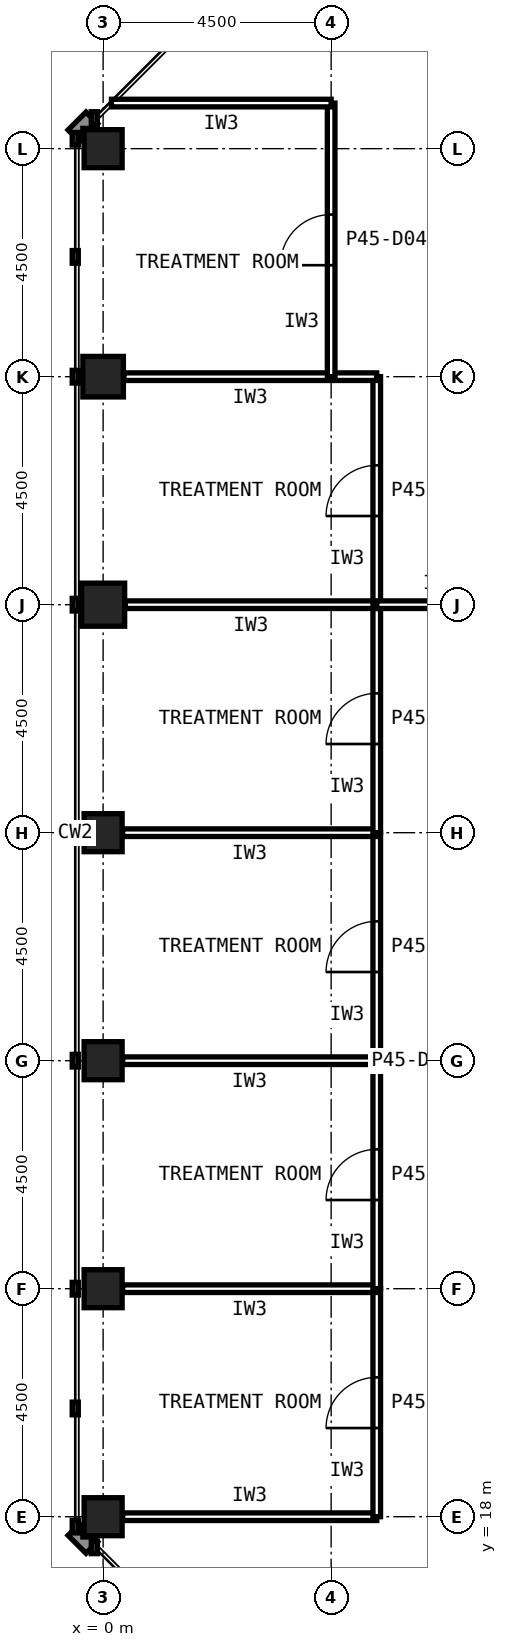
"""IFC4 building model, lengths in metres.
Left out: names, types, materials, properties, quantities, classifications, styles, units other than length and angle.
Written with IfcOpenShell. Run it as: python <this file> out.ifc"""

import sys

from ifc_helpers import new_model, si_unit, direction, frame, frame_2d, origin, origin_2d, place, context, subcontext, project, spatial, rectangle, hollow_rectangle, extrude, element, fill, save


model = new_model("IFC4")
c1 = context("Model", 3, precision=1e-05, world=origin(), true_north=direction((0.0, 1.0)))
c2 = subcontext(c1, "Body", "Model", "MODEL_VIEW")
j1 = project(units=[si_unit("LENGTHUNIT", "METRE"), si_unit("PLANEANGLEUNIT", "RADIAN")], contexts=[c1])
p1 = place(None, origin())
s1 = spatial("IfcSite", under=j1, at=p1, CompositionType="ELEMENT")
p2 = place(p1, origin())
s2 = spatial("IfcBuilding", under=s1, at=p2, CompositionType="ELEMENT")
p3 = place(p2, frame((0.0, 0.0, 191.6)))
s3 = spatial("IfcBuildingStorey", under=s2, at=p3, CompositionType="ELEMENT", Elevation=191.6)
p4 = place(p3, frame((0.0, 45.0, 0.0), z_axis=(0.0, 0.0, 1.0), x_axis=(1.0, 0.0, 0.0)))
e1 = element("IfcColumn", 1, at=p4, inside=s3, PredefinedType="COLUMN", context=c2, shape_type="SweptSolid", body=[
    extrude(hollow_rectangle(XDim=0.75, YDim=0.75, WallThickness=0.04, at=origin_2d()), origin(), (0.0, 0.0, 1.0), 4.0),
])
p5 = place(p3, frame((0.0, 40.5, 0.0), z_axis=(0.0, 0.0, 1.0), x_axis=(1.0, 0.0, 0.0)))
e2 = element("IfcColumn", 2, at=p5, inside=s3, PredefinedType="COLUMN", context=c2, shape_type="SweptSolid", body=[
    extrude(hollow_rectangle(XDim=0.8, YDim=0.8, WallThickness=0.045, at=origin_2d()), origin(), (0.0, 0.0, 1.0), 4.0),
])
p6 = place(p3, frame((0.0, 36.0, 0.0), z_axis=(0.0, 0.0, 1.0), x_axis=(1.0, 0.0, 0.0)))
e3 = element("IfcColumn", 3, at=p6, inside=s3, PredefinedType="COLUMN", context=c2, shape_type="SweptSolid", body=[
    extrude(hollow_rectangle(XDim=0.85, YDim=0.85, WallThickness=0.05, at=origin_2d()), origin(), (0.0, 0.0, 1.0), 4.0),
])
for number, where, z_axis, x_axis in (
    (4, (0.0, 31.5, 0.0), (0.0, 0.0, 1.0), (1.0, 0.0, 0.0)),
    (5, (0.0, 27.0, 0.0), (0.0, 0.0, 1.0), (1.0, 0.0, 0.0)),
    (6, (0.0, 22.5, 0.0), (0.0, 0.0, 1.0), (1.0, 0.0, 0.0)),
    (7, (0.0, 18.0, 0.0), (0.0, 0.0, 1.0), (1.0, 0.0, 0.0)),
):
    element("IfcColumn", number, at=place(p3, frame(where, z_axis=z_axis, x_axis=x_axis)), inside=s3, PredefinedType="COLUMN", context=c2, shape_type="SweptSolid", body=[
        extrude(hollow_rectangle(XDim=0.75, YDim=0.75, WallThickness=0.04, at=origin_2d()), origin(), (0.0, 0.0, 1.0), 4.0),
    ])
p7 = place(p3, frame((0.385, 18.0, 0.0), z_axis=(0.0, 0.0, 1.0), x_axis=(1.0, 0.0, 0.0)))
e8 = element("IfcWall", 8, at=p7, inside=s3, PredefinedType="PARTITIONING", context=c2, shape_type="SweptSolid", body=[
    extrude(rectangle(XDim=5.015, YDim=0.15, at=frame_2d((2.507, 0.0))), origin(), (0.0, 0.0, 1.0), 2.989),
])
p8 = place(p3, frame((5.4, 18.0, 0.0), z_axis=(0.0, 0.0, 1.0), x_axis=(0.0, 1.0, 0.0)))
e9 = element("IfcWall", 9, at=p8, inside=s3, PredefinedType="PARTITIONING", context=c2, shape_type="SweptSolid", body=[
    extrude(rectangle(XDim=4.5, YDim=0.15, at=frame_2d((2.25, 0.0))), origin(), (0.0, 0.0, 1.0), 3.84),
])
p9 = place(p8, frame((1.75, 0.0, 0.0)))
e10 = element("IfcOpeningElement", 10, at=p9, cuts=e9, PredefinedType="OPENING", context=c2, shape_type="SweptSolid", body=[
    extrude(rectangle(XDim=1.0, YDim=2.1, at=frame_2d((0.5, 1.05))), frame((0.0, 0.085, 0.0), z_axis=(0.0, -1.0, 0.0), x_axis=(1.0, 0.0, 0.0)), (0.0, 0.0, 1.0), 0.17),
])
p10 = place(p3, frame((5.4, 22.5, 0.0), z_axis=(0.0, 0.0, 1.0), x_axis=(-1.0, 0.0, 0.0)))
e11 = element("IfcWall", 11, at=p10, inside=s3, PredefinedType="PARTITIONING", context=c2, shape_type="SweptSolid", body=[
    extrude(rectangle(XDim=5.015, YDim=0.15, at=frame_2d((2.507, 0.0))), origin(), (0.0, 0.0, 1.0), 2.989),
])
p11 = place(p3, frame((5.4, 22.5, 0.0), z_axis=(0.0, 0.0, 1.0), x_axis=(0.0, 1.0, 0.0)))
e12 = element("IfcWall", 12, at=p11, inside=s3, PredefinedType="PARTITIONING", context=c2, shape_type="SweptSolid", body=[
    extrude(rectangle(XDim=4.5, YDim=0.15, at=frame_2d((2.25, 0.0))), origin(), (0.0, 0.0, 1.0), 3.84),
])
p12 = place(p11, frame((1.75, 0.0, 0.0)))
e13 = element("IfcOpeningElement", 13, at=p12, cuts=e12, PredefinedType="OPENING", context=c2, shape_type="SweptSolid", body=[
    extrude(rectangle(XDim=1.0, YDim=2.1, at=frame_2d((0.5, 1.05))), frame((0.0, 0.085, 0.0), z_axis=(0.0, -1.0, 0.0), x_axis=(1.0, 0.0, 0.0)), (0.0, 0.0, 1.0), 0.17),
])
p13 = place(p3, frame((5.4, 27.0, 0.0), z_axis=(0.0, 0.0, 1.0), x_axis=(-1.0, 0.0, 0.0)))
e14 = element("IfcWall", 14, at=p13, inside=s3, PredefinedType="PARTITIONING", context=c2, shape_type="SweptSolid", body=[
    extrude(rectangle(XDim=5.015, YDim=0.15, at=frame_2d((2.507, 0.0))), origin(), (0.0, 0.0, 1.0), 2.989),
])
p14 = place(p3, frame((5.4, 27.0, 0.0), z_axis=(0.0, 0.0, 1.0), x_axis=(0.0, 1.0, 0.0)))
e15 = element("IfcWall", 15, at=p14, inside=s3, PredefinedType="PARTITIONING", context=c2, shape_type="SweptSolid", body=[
    extrude(rectangle(XDim=4.5, YDim=0.15, at=frame_2d((2.25, 0.0))), origin(), (0.0, 0.0, 1.0), 3.84),
])
p15 = place(p14, frame((1.75, 0.0, 0.0)))
e16 = element("IfcOpeningElement", 16, at=p15, cuts=e15, PredefinedType="OPENING", context=c2, shape_type="SweptSolid", body=[
    extrude(rectangle(XDim=1.0, YDim=2.1, at=frame_2d((0.5, 1.05))), frame((0.0, 0.085, 0.0), z_axis=(0.0, -1.0, 0.0), x_axis=(1.0, 0.0, 0.0)), (0.0, 0.0, 1.0), 0.17),
])
p16 = place(p3, frame((5.4, 31.5, 0.0), z_axis=(0.0, 0.0, 1.0), x_axis=(-1.0, 0.0, 0.0)))
e17 = element("IfcWall", 17, at=p16, inside=s3, PredefinedType="PARTITIONING", context=c2, shape_type="SweptSolid", body=[
    extrude(rectangle(XDim=5.015, YDim=0.15, at=frame_2d((2.507, 0.0))), origin(), (0.0, 0.0, 1.0), 2.989),
])
p17 = place(p3, frame((5.4, 31.5, 0.0), z_axis=(0.0, 0.0, 1.0), x_axis=(0.0, 1.0, 0.0)))
e18 = element("IfcWall", 18, at=p17, inside=s3, PredefinedType="PARTITIONING", context=c2, shape_type="SweptSolid", body=[
    extrude(rectangle(XDim=4.5, YDim=0.15, at=frame_2d((2.25, 0.0))), origin(), (0.0, 0.0, 1.0), 3.84),
])
p18 = place(p17, frame((1.75, 0.0, 0.0)))
e19 = element("IfcOpeningElement", 19, at=p18, cuts=e18, PredefinedType="OPENING", context=c2, shape_type="SweptSolid", body=[
    extrude(rectangle(XDim=1.0, YDim=2.1, at=frame_2d((0.5, 1.05))), frame((0.0, 0.085, 0.0), z_axis=(0.0, -1.0, 0.0), x_axis=(1.0, 0.0, 0.0)), (0.0, 0.0, 1.0), 0.17),
])
p19 = place(p3, frame((5.4, 36.0, 0.0), z_axis=(0.0, 0.0, 1.0), x_axis=(-1.0, 0.0, 0.0)))
e20 = element("IfcWall", 20, at=p19, inside=s3, PredefinedType="PARTITIONING", context=c2, shape_type="SweptSolid", body=[
    extrude(rectangle(XDim=4.965, YDim=0.15, at=frame_2d((2.482, 0.0))), origin(), (0.0, 0.0, 1.0), 2.989),
])
p20 = place(p3, frame((5.4, 36.0, 0.0), z_axis=(0.0, 0.0, 1.0), x_axis=(0.0, 1.0, 0.0)))
e21 = element("IfcWall", 21, at=p20, inside=s3, PredefinedType="PARTITIONING", context=c2, shape_type="SweptSolid", body=[
    extrude(rectangle(XDim=4.5, YDim=0.15, at=frame_2d((2.25, 0.0))), origin(), (0.0, 0.0, 1.0), 3.84),
])
p21 = place(p20, frame((1.75, 0.0, 0.0)))
e22 = element("IfcOpeningElement", 22, at=p21, cuts=e21, PredefinedType="OPENING", context=c2, shape_type="SweptSolid", body=[
    extrude(rectangle(XDim=1.0, YDim=2.1, at=frame_2d((0.5, 1.05))), frame((0.0, 0.085, 0.0), z_axis=(0.0, -1.0, 0.0), x_axis=(1.0, 0.0, 0.0)), (0.0, 0.0, 1.0), 0.17),
])
p22 = place(p3, frame((5.4, 40.5, 0.0), z_axis=(0.0, 0.0, 1.0), x_axis=(-1.0, 0.0, 0.0)))
e23 = element("IfcWall", 23, at=p22, inside=s3, PredefinedType="PARTITIONING", context=c2, shape_type="SweptSolid", body=[
    extrude(rectangle(XDim=4.99, YDim=0.15, at=frame_2d((2.495, 0.0))), origin(), (0.0, 0.0, 1.0), 2.989),
])
p23 = place(p3, frame((4.5, 40.5, 0.0), z_axis=(0.0, 0.0, 1.0), x_axis=(0.0, 1.0, 0.0)))
e24 = element("IfcWall", 24, at=p23, inside=s3, PredefinedType="PARTITIONING", context=c2, shape_type="SweptSolid", body=[
    extrude(rectangle(XDim=5.4, YDim=0.15, at=frame_2d((2.7, 0.0))), origin(), (0.0, 0.0, 1.0), 3.84),
])
p24 = place(p23, frame((2.2, 0.0, 0.0)))
e25 = element("IfcOpeningElement", 25, at=p24, cuts=e24, PredefinedType="OPENING", context=c2, shape_type="SweptSolid", body=[
    extrude(rectangle(XDim=1.0, YDim=2.1, at=frame_2d((0.5, 1.05))), frame((0.0, 0.085, 0.0), z_axis=(0.0, -1.0, 0.0), x_axis=(1.0, 0.0, 0.0)), (0.0, 0.0, 1.0), 0.17),
])
p25 = place(p3, frame((4.5, 45.9, 0.0), z_axis=(0.0, 0.0, 1.0), x_axis=(-1.0, 0.0, 0.0)))
e26 = element("IfcWall", 26, at=p25, inside=s3, PredefinedType="PARTITIONING", context=c2, shape_type="SweptSolid", body=[
    extrude(rectangle(XDim=4.335, YDim=0.15, at=frame_2d((2.168, 0.0))), origin(), (0.0, 0.0, 1.0), 3.84),
])
p26 = place(p3, frame((5.4, 36.0, 0.0), z_axis=(0.0, 0.0, 1.0), x_axis=(1.0, 0.0, 0.0)))
e27 = element("IfcWall", 27, at=p26, inside=s3, PredefinedType="PARTITIONING", context=c2, shape_type="SweptSolid", body=[
    extrude(rectangle(XDim=6.3, YDim=0.15, at=frame_2d((3.15, 0.0))), origin(), (0.0, 0.0, 1.0), 2.989),
])
p27 = place(p26, frame((2.65, 0.0, 0.0)))
e28 = element("IfcOpeningElement", 28, at=p27, cuts=e27, PredefinedType="OPENING", context=c2, shape_type="SweptSolid", body=[
    extrude(rectangle(XDim=1.0, YDim=2.1, at=frame_2d((0.5, 1.05))), frame((0.0, 0.085, 0.0), z_axis=(0.0, -1.0, 0.0), x_axis=(1.0, 0.0, 0.0)), (0.0, 0.0, 1.0), 0.17),
])
p28 = place(p9, origin())
e29 = element("IfcDoor", 29, at=p28, inside=s3, OperationType="SINGLE_SWING_LEFT", PredefinedType="DOOR", context=c2, shape_type="SweptSolid", body=[
    extrude(rectangle(XDim=1.0, YDim=2.1, at=frame_2d((0.5, 1.05))), frame((0.0, 0.025, 0.0), z_axis=(0.0, -1.0, 0.0), x_axis=(1.0, 0.0, 0.0)), (0.0, 0.0, 1.0), 0.05),
])
fill(e10, e29)
p29 = place(p12, origin())
e30 = element("IfcDoor", 30, at=p29, inside=s3, OperationType="SINGLE_SWING_LEFT", PredefinedType="DOOR", context=c2, shape_type="SweptSolid", body=[
    extrude(rectangle(XDim=1.0, YDim=2.1, at=frame_2d((0.5, 1.05))), frame((0.0, 0.025, 0.0), z_axis=(0.0, -1.0, 0.0), x_axis=(1.0, 0.0, 0.0)), (0.0, 0.0, 1.0), 0.05),
])
fill(e13, e30)
p30 = place(p15, origin())
e31 = element("IfcDoor", 31, at=p30, inside=s3, OperationType="SINGLE_SWING_LEFT", PredefinedType="DOOR", context=c2, shape_type="SweptSolid", body=[
    extrude(rectangle(XDim=1.0, YDim=2.1, at=frame_2d((0.5, 1.05))), frame((0.0, 0.025, 0.0), z_axis=(0.0, -1.0, 0.0), x_axis=(1.0, 0.0, 0.0)), (0.0, 0.0, 1.0), 0.05),
])
fill(e16, e31)
p31 = place(p18, origin())
e32 = element("IfcDoor", 32, at=p31, inside=s3, OperationType="SINGLE_SWING_LEFT", PredefinedType="DOOR", context=c2, shape_type="SweptSolid", body=[
    extrude(rectangle(XDim=1.0, YDim=2.1, at=frame_2d((0.5, 1.05))), frame((0.0, 0.025, 0.0), z_axis=(0.0, -1.0, 0.0), x_axis=(1.0, 0.0, 0.0)), (0.0, 0.0, 1.0), 0.05),
])
fill(e19, e32)
p32 = place(p21, origin())
e33 = element("IfcDoor", 33, at=p32, inside=s3, OperationType="SINGLE_SWING_LEFT", PredefinedType="DOOR", context=c2, shape_type="SweptSolid", body=[
    extrude(rectangle(XDim=1.0, YDim=2.1, at=frame_2d((0.5, 1.05))), frame((0.0, 0.025, 0.0), z_axis=(0.0, -1.0, 0.0), x_axis=(1.0, 0.0, 0.0)), (0.0, 0.0, 1.0), 0.05),
])
fill(e22, e33)
p33 = place(p24, origin())
e34 = element("IfcDoor", 34, at=p33, inside=s3, OperationType="SINGLE_SWING_LEFT", PredefinedType="DOOR", context=c2, shape_type="SweptSolid", body=[
    extrude(rectangle(XDim=1.0, YDim=2.1, at=frame_2d((0.5, 1.05))), frame((0.0, 0.025, 0.0), z_axis=(0.0, -1.0, 0.0), x_axis=(1.0, 0.0, 0.0)), (0.0, 0.0, 1.0), 0.05),
])
fill(e25, e34)
save(model, sys.argv[1])
